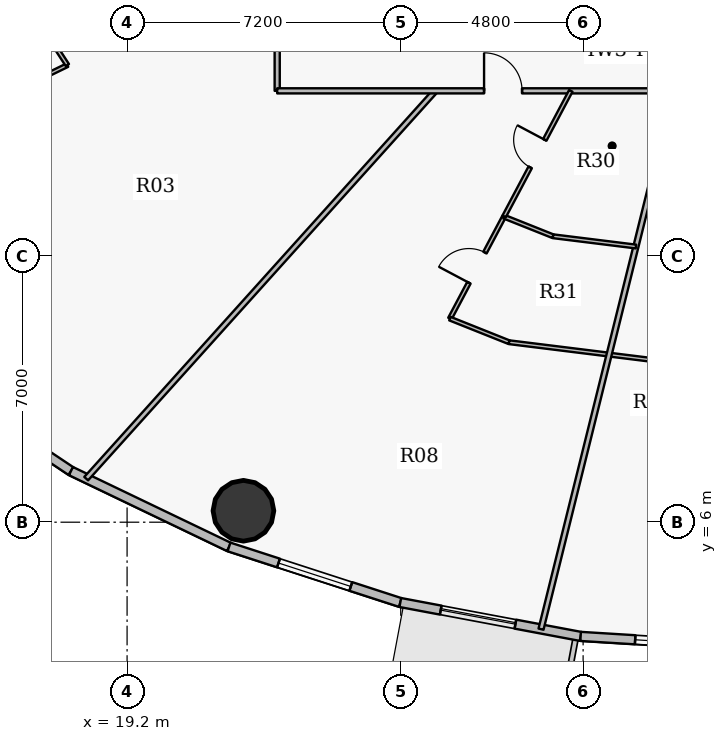
"""IFC4 building model, lengths in metres.
Left out: names, types, materials, properties, quantities, classifications, styles, units other than length and angle.
Written with IfcOpenShell. Run it as: python <this file> out.ifc"""

import sys

from ifc_helpers import new_model, si_unit, direction, frame, frame_2d, origin, origin_2d, place, context, subcontext, project, spatial, rectangle, hollow_circle, extrude, source, transform, mapped, element, fill, save


model = new_model("IFC4")
c1 = context("Model", 3, precision=1e-05, world=origin(), true_north=direction((0.0, 1.0)))
c2 = subcontext(c1, "Body", "Model", "MODEL_VIEW")
j1 = project(units=[si_unit("LENGTHUNIT", "METRE"), si_unit("PLANEANGLEUNIT", "RADIAN")], contexts=[c1])
p1 = place(None, origin())
s1 = spatial("IfcSite", under=j1, at=p1, CompositionType="ELEMENT")
p2 = place(p1, origin())
s2 = spatial("IfcBuilding", under=s1, at=p2, CompositionType="ELEMENT")
p3 = place(p2, frame((0.0, 0.0, 66.0)))
s3 = spatial("IfcBuildingStorey", under=s2, at=p3, CompositionType="ELEMENT", Elevation=66.0)
p4 = place(p3, frame((22.262, 6.301, 0.0), z_axis=(0.0, 0.0, 1.0), x_axis=(1.0, 0.0, 0.0)))
e1 = element("IfcColumn", 1, at=p4, inside=s3, PredefinedType="COLUMN", context=c2, shape_type="SweptSolid", body=[
    extrude(hollow_circle(Radius=0.8, WallThickness=0.045, at=origin_2d()), origin(), (0.0, 0.0, 1.0), 4.2),
])
p5 = place(p3, frame((17.723, 7.344, 0.0), z_axis=(0.0, 0.0, 1.0), x_axis=(-0.831240982525, 0.555912249343, 0.0)))
e2 = element("IfcWall", 2, at=p5, inside=s3, PredefinedType="SOLIDWALL", context=c2, shape_type="SweptSolid", body=[
    extrude(rectangle(XDim=4.46, YDim=0.24, at=frame_2d((2.23, 0.0))), origin(), (0.0, 0.0, 1.0), 3.95),
])
p6 = place(p5, frame((1.23, 0.0, 0.9)))
e3 = element("IfcOpeningElement", 3, at=p6, cuts=e2, PredefinedType="OPENING", context=c2, shape_type="SweptSolid", body=[
    extrude(rectangle(XDim=2.0, YDim=1.75, at=origin_2d()), frame((1.0, 0.13, 0.875), z_axis=(0.0, -1.0, 0.0), x_axis=(1.0, 0.0, 0.0)), (0.0, 0.0, 1.0), 0.26),
])
p7 = place(p3, frame((21.882, 5.349, 0.0), z_axis=(0.0, 0.0, 1.0), x_axis=(-0.901601503137, 0.432567601123, 0.0)))
e4 = element("IfcWall", 4, at=p7, inside=s3, PredefinedType="SOLIDWALL", context=c2, shape_type="SweptSolid", body=[
    extrude(rectangle(XDim=4.613, YDim=0.24, at=frame_2d((2.306, 0.0))), origin(), (0.0, 0.0, 1.0), 3.95),
])
p8 = place(p3, frame((26.389, 3.887, 0.0), z_axis=(0.0, 0.0, 1.0), x_axis=(-0.951207699013, 0.308551313946, 0.0)))
e5 = element("IfcWall", 5, at=p8, inside=s3, PredefinedType="SOLIDWALL", context=c2, shape_type="SweptSolid", body=[
    extrude(rectangle(XDim=4.739, YDim=0.24, at=frame_2d((2.369, 0.0))), origin(), (0.0, 0.0, 1.0), 3.95),
])
p9 = place(p8, frame((1.369, 0.0, 0.9)))
e6 = element("IfcOpeningElement", 6, at=p9, cuts=e5, PredefinedType="OPENING", context=c2, shape_type="SweptSolid", body=[
    extrude(rectangle(XDim=2.0, YDim=1.75, at=origin_2d()), frame((1.0, 0.13, 0.875), z_axis=(0.0, -1.0, 0.0), x_axis=(1.0, 0.0, 0.0)), (0.0, 0.0, 1.0), 0.26),
])
p10 = place(p3, frame((31.135, 2.995, 0.0), z_axis=(0.0, 0.0, 1.0), x_axis=(-0.982791952378, 0.184715939598, 0.0)))
e7 = element("IfcWall", 7, at=p10, inside=s3, PredefinedType="SOLIDWALL", context=c2, shape_type="SweptSolid", body=[
    extrude(rectangle(XDim=4.828, YDim=0.24, at=frame_2d((2.414, 0.0))), origin(), (0.0, 0.0, 1.0), 3.95),
])
p11 = place(p10, frame((1.746, 0.0, 0.9)))
e8 = element("IfcOpeningElement", 8, at=p11, cuts=e7, PredefinedType="OPENING", context=c2, shape_type="SweptSolid", body=[
    extrude(rectangle(XDim=2.0, YDim=1.75, at=origin_2d()), frame((1.0, 0.13, 0.875), z_axis=(0.0, -1.0, 0.0), x_axis=(1.0, 0.0, 0.0)), (0.0, 0.0, 1.0), 0.26),
])
p12 = place(p3, frame((36.0, 2.695, 0.0), z_axis=(0.0, 0.0, 1.0), x_axis=(-0.998106954071, 0.061502099433, 0.0)))
e9 = element("IfcWall", 9, at=p12, inside=s3, PredefinedType="SOLIDWALL", context=c2, shape_type="SweptSolid", body=[
    extrude(rectangle(XDim=4.875, YDim=0.24, at=frame_2d((2.438, 0.0))), origin(), (0.0, 0.0, 1.0), 3.95),
])
p13 = place(p12, frame((1.437, 0.0, 0.9)))
e10 = element("IfcOpeningElement", 10, at=p13, cuts=e9, PredefinedType="OPENING", context=c2, shape_type="SweptSolid", body=[
    extrude(rectangle(XDim=2.0, YDim=1.75, at=origin_2d()), frame((1.0, 0.13, 0.875), z_axis=(0.0, -1.0, 0.0), x_axis=(1.0, 0.0, 0.0)), (0.0, 0.0, 1.0), 0.26),
])
p14 = place(p3, frame((9.719, 14.163, 0.0), z_axis=(0.0, 0.0, 1.0), x_axis=(0.898526567573, 0.438919135339, 0.0)))
e11 = element("IfcWall", 11, at=p14, inside=s3, PredefinedType="PARTITIONING", context=c2, shape_type="SweptSolid", body=[
    extrude(rectangle(XDim=8.803, YDim=0.1, at=frame_2d((4.402, 0.0))), origin(), (0.0, 0.0, 1.0), 3.335),
])
p15 = place(p14, frame((6.191, 0.0, 0.0)))
e12 = element("IfcOpeningElement", 12, at=p15, cuts=e11, PredefinedType="OPENING", context=c2, shape_type="SweptSolid", body=[
    extrude(rectangle(XDim=0.9, YDim=2.1, at=origin_2d()), frame((0.45, 0.06, 1.05), z_axis=(0.0, -1.0, 0.0), x_axis=(1.0, 0.0, 0.0)), (0.0, 0.0, 1.0), 0.12),
])
p16 = place(p14, frame((0.843, 0.0, 0.0)))
e13 = element("IfcOpeningElement", 13, at=p16, cuts=e11, PredefinedType="OPENING", context=c2, shape_type="SweptSolid", body=[
    extrude(rectangle(XDim=0.82, YDim=2.1, at=origin_2d()), frame((0.41, 0.06, 1.05), z_axis=(0.0, -1.0, 0.0), x_axis=(1.0, 0.0, 0.0)), (0.0, 0.0, 1.0), 0.12),
])
p17 = place(p3, frame((15.229, 21.716, 0.0), z_axis=(0.0, 0.0, 1.0), x_axis=(0.545423102052, -0.838160867464, 0.0)))
e14 = element("IfcWall", 14, at=p17, inside=s3, PredefinedType="PARTITIONING", context=c2, shape_type="SweptSolid", body=[
    extrude(rectangle(XDim=4.401, YDim=0.1, at=frame_2d((2.2, 0.0))), origin(), (0.0, 0.0, 1.0), 3.285),
])
p18 = place(p3, frame((18.124, 7.146, 0.0), z_axis=(0.0, 0.0, 1.0), x_axis=(0.669125827692, 0.743149128181, 0.0)))
e15 = element("IfcWall", 15, at=p18, inside=s3, PredefinedType="PARTITIONING", context=c2, shape_type="SweptSolid", body=[
    extrude(rectangle(XDim=13.73, YDim=0.135, at=frame_2d((6.865, 0.0))), origin(), (0.0, 0.0, 1.0), 3.335),
])
p19 = place(p3, frame((23.15, 17.35, 0.0), z_axis=(0.0, 0.0, 1.0), x_axis=(0.0, 1.0, 0.0)))
e16 = element("IfcWall", 16, at=p19, inside=s3, PredefinedType="PARTITIONING", context=c2, shape_type="SweptSolid", body=[
    extrude(rectangle(XDim=6.011, YDim=0.135, at=frame_2d((3.006, 0.0))), origin(), (0.0, 0.0, 1.0), 3.285),
])
p20 = place(p19, frame((2.506, 0.0, 0.0)))
e17 = element("IfcOpeningElement", 17, at=p20, cuts=e16, PredefinedType="OPENING", context=c2, shape_type="SweptSolid", body=[
    extrude(rectangle(XDim=1.0, YDim=2.15, at=origin_2d()), frame((0.5, 0.078, 1.075), z_axis=(0.0, -1.0, 0.0), x_axis=(1.0, 0.0, 0.0)), (0.0, 0.0, 1.0), 0.155),
])
p21 = place(p3, frame((23.15, 17.35, 0.0), z_axis=(0.0, 0.0, 1.0), x_axis=(1.0, 0.0, 0.0)))
e18 = element("IfcWall", 18, at=p21, inside=s3, PredefinedType="PARTITIONING", context=c2, shape_type="SweptSolid", body=[
    extrude(rectangle(XDim=10.456, YDim=0.135, at=frame_2d((5.228, 0.0))), origin(), (0.0, 0.0, 1.0), 3.285),
])
p22 = place(p21, frame((5.444, 0.0, 0.0)))
e19 = element("IfcOpeningElement", 19, at=p22, cuts=e18, PredefinedType="OPENING", context=c2, shape_type="SweptSolid", body=[
    extrude(rectangle(XDim=1.0, YDim=2.15, at=origin_2d()), frame((0.5, 0.078, 1.075), z_axis=(0.0, -1.0, 0.0), x_axis=(1.0, 0.0, 0.0)), (0.0, 0.0, 1.0), 0.155),
])
p23 = place(p3, frame((27.694, 11.357, 0.0), z_axis=(0.0, 0.0, 1.0), x_axis=(0.468918098925, 0.883241652381, 0.0)))
e20 = element("IfcWall", 20, at=p23, inside=s3, PredefinedType="PARTITIONING", context=c2, shape_type="SweptSolid", body=[
    extrude(rectangle(XDim=3.036, YDim=0.1, at=frame_2d((1.518, 0.0))), origin(), (0.0, 0.0, 1.0), 3.95),
])
p24 = place(p23, frame((1.068, 0.0, 0.0)))
e21 = element("IfcOpeningElement", 21, at=p24, cuts=e20, PredefinedType="OPENING", context=c2, shape_type="SweptSolid", body=[
    extrude(rectangle(XDim=0.9, YDim=2.1, at=origin_2d()), frame((0.45, 0.06, 1.05), z_axis=(0.0, -1.0, 0.0), x_axis=(1.0, 0.0, 0.0)), (0.0, 0.0, 1.0), 0.12),
])
p25 = place(p3, frame((27.694, 11.357, 0.0), z_axis=(0.0, 0.0, 1.0), x_axis=(0.928847957875, -0.370461160112, 0.0)))
e22 = element("IfcWall", 22, at=p25, inside=s3, PredefinedType="PARTITIONING", context=c2, shape_type="SweptSolid", body=[
    extrude(rectangle(XDim=1.676, YDim=0.1, at=frame_2d((0.838, 0.0))), origin(), (0.0, 0.0, 1.0), 3.95),
])
p26 = place(p3, frame((29.118, 14.039, 0.0), z_axis=(0.0, 0.0, 1.0), x_axis=(0.928791597639, -0.370602439489, 0.0)))
e23 = element("IfcWall", 23, at=p26, inside=s3, PredefinedType="PARTITIONING", context=c2, shape_type="SweptSolid", body=[
    extrude(rectangle(XDim=1.389, YDim=0.1, at=frame_2d((0.694, 0.0))), origin(), (0.0, 0.0, 1.0), 3.95),
])
p27 = place(p3, frame((29.123, 14.048, 0.0), z_axis=(0.0, 0.0, 1.0), x_axis=(0.468940383898, 0.8832298208, 0.0)))
e24 = element("IfcWall", 24, at=p27, inside=s3, PredefinedType="PARTITIONING", context=c2, shape_type="SweptSolid", body=[
    extrude(rectangle(XDim=3.739, YDim=0.1, at=frame_2d((1.87, 0.0))), origin(), (0.0, 0.0, 1.0), 3.95),
])
p28 = place(p27, frame((1.46, 0.0, 0.0)))
e25 = element("IfcOpeningElement", 25, at=p28, cuts=e24, PredefinedType="OPENING", context=c2, shape_type="SweptSolid", body=[
    extrude(rectangle(XDim=0.82, YDim=2.1, at=origin_2d()), frame((0.41, 0.06, 1.05), z_axis=(0.0, -1.0, 0.0), x_axis=(1.0, 0.0, 0.0)), (0.0, 0.0, 1.0), 0.12),
])
p29 = place(p3, frame((29.251, 10.736, 0.0), z_axis=(0.0, 0.0, 1.0), x_axis=(0.992394520877, -0.123097989151, 0.0)))
e26 = element("IfcWall", 26, at=p29, inside=s3, PredefinedType="PARTITIONING", context=c2, shape_type="SweptSolid", body=[
    extrude(rectangle(XDim=6.801, YDim=0.1, at=frame_2d((3.4, 0.0))), origin(), (0.0, 0.0, 1.0), 3.285),
])
p30 = place(p3, frame((30.092, 3.186, 0.0), z_axis=(0.0, 0.0, 1.0), x_axis=(0.240785833135, 0.970578272249, 0.0)))
e27 = element("IfcWall", 27, at=p30, inside=s3, PredefinedType="PARTITIONING", context=c2, shape_type="SweptSolid", body=[
    extrude(rectangle(XDim=13.792, YDim=0.135, at=frame_2d((6.896, 0.0))), origin(), (0.0, 0.0, 1.0), 3.335),
])
p31 = place(p3, frame((30.408, 13.524, 0.0), z_axis=(0.0, 0.0, 1.0), x_axis=(0.992388521758, -0.123146343362, 0.0)))
e28 = element("IfcWall", 28, at=p31, inside=s3, PredefinedType="PARTITIONING", context=c2, shape_type="SweptSolid", body=[
    extrude(rectangle(XDim=2.199, YDim=0.1, at=frame_2d((1.099, 0.0))), origin(), (0.0, 0.0, 1.0), 3.95),
])
m1 = source(origin(), c2, "Body", "SweptSolid", [
    extrude(rectangle(XDim=2.0, YDim=1.75, at=origin_2d()), frame((1.0, 0.03, 0.875), z_axis=(0.0, -1.0, 0.0), x_axis=(1.0, 0.0, 0.0)), (0.0, 0.0, 1.0), 0.06),
])
p32 = place(p9, origin())
e29 = element("IfcWindow", 29, at=p32, inside=s3, PartitioningType="DOUBLE_PANEL_VERTICAL", PredefinedType="WINDOW", context=c2, shape_type="MappedRepresentation", body=[
    mapped(m1, transform((0.0, 0.0, 0.0), x_axis=(1.0, 0.0, 0.0), y_axis=(0.0, 1.0, 0.0), z_axis=(0.0, 0.0, 1.0), scale=1.0)),
])
fill(e6, e29)
p33 = place(p11, origin())
e30 = element("IfcWindow", 30, at=p33, inside=s3, PartitioningType="DOUBLE_PANEL_VERTICAL", PredefinedType="WINDOW", context=c2, shape_type="MappedRepresentation", body=[
    mapped(m1, transform((0.0, 0.0, 0.0), x_axis=(1.0, 0.0, 0.0), y_axis=(0.0, 1.0, 0.0), z_axis=(0.0, 0.0, 1.0), scale=1.0)),
])
fill(e8, e30)
p34 = place(p13, origin())
e31 = element("IfcWindow", 31, at=p34, inside=s3, PartitioningType="DOUBLE_PANEL_VERTICAL", PredefinedType="WINDOW", context=c2, shape_type="MappedRepresentation", body=[
    mapped(m1, transform((0.0, 0.0, 0.0), x_axis=(1.0, 0.0, 0.0), y_axis=(0.0, 1.0, 0.0), z_axis=(0.0, 0.0, 1.0), scale=1.0)),
])
fill(e10, e31)
m2 = source(origin(), c2, "Body", "SweptSolid", [
    extrude(rectangle(XDim=1.0, YDim=2.15, at=origin_2d()), frame((0.5, 0.025, 1.075), z_axis=(0.0, -1.0, 0.0), x_axis=(1.0, 0.0, 0.0)), (0.0, 0.0, 1.0), 0.05),
])
p35 = place(p22, origin())
e32 = element("IfcDoor", 32, at=p35, inside=s3, OperationType="SINGLE_SWING_LEFT", PredefinedType="DOOR", context=c2, shape_type="MappedRepresentation", body=[
    mapped(m2, transform((0.0, 0.0, 0.0), x_axis=(1.0, 0.0, 0.0), y_axis=(0.0, 1.0, 0.0), z_axis=(0.0, 0.0, 1.0), scale=1.0)),
])
fill(e19, e32)
m3 = source(origin(), c2, "Body", "SweptSolid", [
    extrude(rectangle(XDim=0.82, YDim=2.1, at=origin_2d()), frame((0.41, 0.025, 1.05), z_axis=(0.0, -1.0, 0.0), x_axis=(1.0, 0.0, 0.0)), (0.0, 0.0, 1.0), 0.05),
])
p36 = place(p28, origin())
e33 = element("IfcDoor", 33, at=p36, inside=s3, OperationType="SINGLE_SWING_RIGHT", PredefinedType="DOOR", context=c2, shape_type="MappedRepresentation", body=[
    mapped(m3, transform((0.0, 0.0, 0.0), x_axis=(1.0, 0.0, 0.0), y_axis=(0.0, 1.0, 0.0), z_axis=(0.0, 0.0, 1.0), scale=1.0)),
])
fill(e25, e33)
m4 = source(origin(), c2, "Body", "SweptSolid", [
    extrude(rectangle(XDim=0.9, YDim=2.1, at=origin_2d()), frame((0.45, 0.025, 1.05), z_axis=(0.0, -1.0, 0.0), x_axis=(1.0, 0.0, 0.0)), (0.0, 0.0, 1.0), 0.05),
])
p37 = place(p24, origin())
e34 = element("IfcDoor", 34, at=p37, inside=s3, OperationType="SINGLE_SWING_LEFT", PredefinedType="DOOR", context=c2, shape_type="MappedRepresentation", body=[
    mapped(m4, transform((0.0, 0.0, 0.0), x_axis=(1.0, 0.0, 0.0), y_axis=(0.0, 1.0, 0.0), z_axis=(0.0, 0.0, 1.0), scale=1.0)),
])
fill(e21, e34)
save(model, sys.argv[1])
